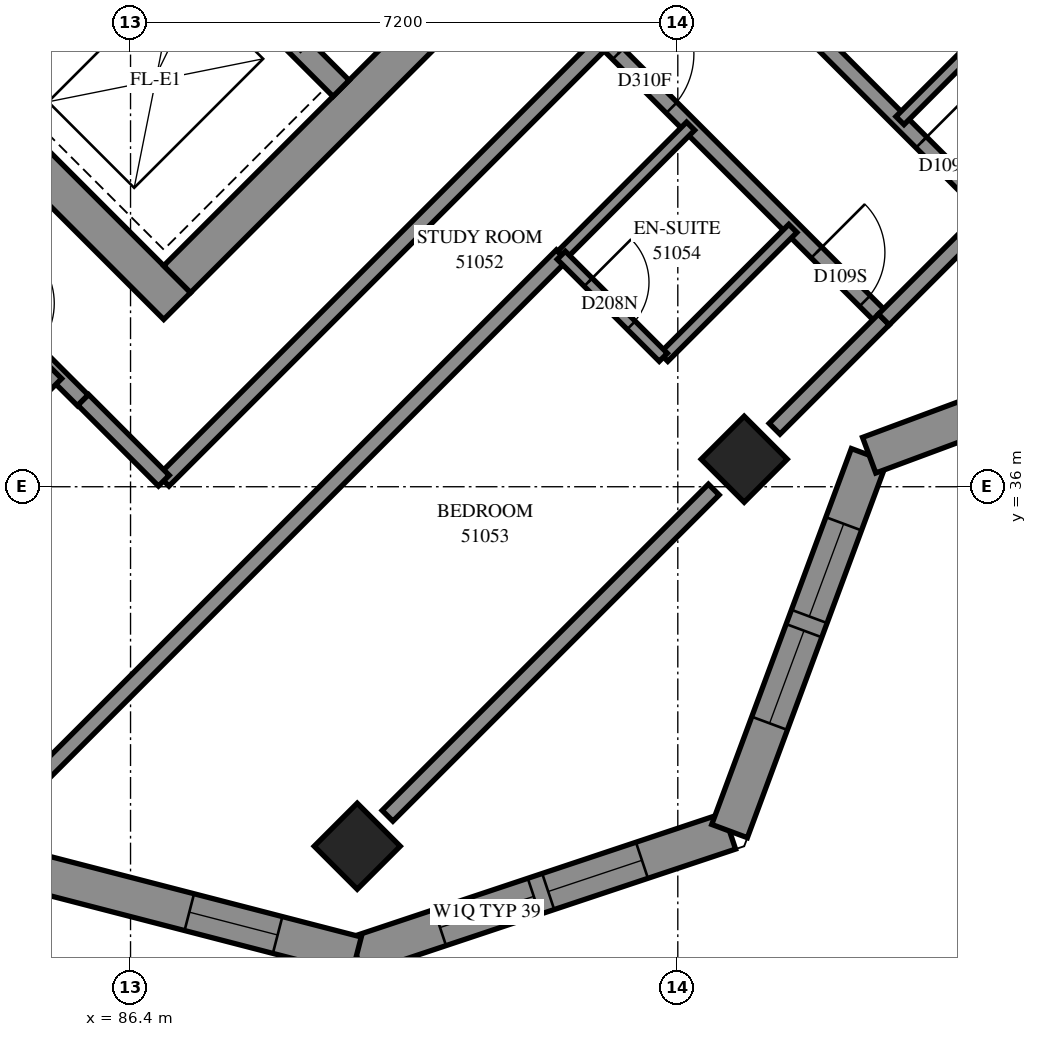
"""IFC4 building model, lengths in metres.
Left out: names, types, materials, properties, quantities, classifications, styles, units other than length and angle.
Written with IfcOpenShell. Run it as: python <this file> out.ifc"""

import sys

from ifc_helpers import new_model, si_unit, direction, frame, frame_2d, origin, origin_2d, place, context, subcontext, project, spatial, polyline, rectangle, outline, extrude, element, fill, save


model = new_model("IFC4")
c1 = context("Model", 3, precision=1e-05, world=origin(), true_north=direction((0.0, 1.0)))
c2 = subcontext(c1, "Body", "Model", "MODEL_VIEW")
j1 = project(units=[si_unit("LENGTHUNIT", "METRE"), si_unit("PLANEANGLEUNIT", "RADIAN")], contexts=[c1])
p1 = place(None, origin())
s1 = spatial("IfcSite", under=j1, at=p1, CompositionType="ELEMENT")
p2 = place(p1, origin())
s2 = spatial("IfcBuilding", under=s1, at=p2, CompositionType="ELEMENT")
p3 = place(p2, frame((0.0, 0.0, 189.6)))
s3 = spatial("IfcBuildingStorey", under=s2, at=p3, CompositionType="ELEMENT", Elevation=189.6)
for number, where, z_axis, x_axis in (
    (1, (94.474, 36.362, 0.0), (0.0, 0.0, 1.0), (0.707, -0.707, 0.0)),
    (2, (89.382, 31.271, 0.0), (0.0, 0.0, 1.0), (0.707, -0.707, 0.0)),
):
    element("IfcColumn", number, at=place(p3, frame(where, z_axis=z_axis, x_axis=x_axis)), inside=s3, PredefinedType="COLUMN", context=c2, shape_type="SweptSolid", body=[
        extrude(rectangle(XDim=0.8, YDim=0.8, at=origin_2d()), origin(), (0.0, 0.0, 1.0), 3.1),
    ])
p4 = place(p3, frame((76.124, 49.267, -0.3), z_axis=(0.0, 0.0, 1.0), x_axis=(0.7071067812, -0.7071067812, 0.0)))
e3 = element("IfcWall", 3, at=p4, inside=s3, PredefinedType="SHEAR", context=c2, shape_type="SweptSolid", body=[
    extrude(rectangle(XDim=15.4, YDim=0.5, at=frame_2d((7.7, 0.0))), origin(), (0.0, 0.0, 1.0), 2.7),
])
p5 = place(p3, frame((87.013, 38.731, -0.3), z_axis=(0.0, 0.0, 1.0), x_axis=(0.7071067812, 0.7071067812, 0.0)))
e4 = element("IfcWall", 4, at=p5, inside=s3, PredefinedType="SHEAR", context=c2, shape_type="SweptSolid", body=[
    extrude(rectangle(XDim=14.4, YDim=0.5, at=frame_2d((7.2, 0.0))), origin(), (0.0, 0.0, 1.0), 2.7),
])
p6 = place(p5, frame((4.55, 0.0, 0.3)))
e5 = element("IfcOpeningElement", 5, at=p6, cuts=e4, PredefinedType="OPENING", context=c2, shape_type="SweptSolid", body=[
    extrude(rectangle(XDim=1.1, YDim=2.1, at=frame_2d((0.55, 1.05))), frame((0.0, 0.26, 0.0), z_axis=(0.0, -1.0, 0.0), x_axis=(1.0, 0.0, 0.0)), (0.0, 0.0, 1.0), 0.52),
])
p7 = place(p5, frame((11.35, 0.0, 0.3)))
e6 = element("IfcOpeningElement", 6, at=p7, cuts=e4, PredefinedType="OPENING", context=c2, shape_type="SweptSolid", body=[
    extrude(rectangle(XDim=1.1, YDim=2.1, at=frame_2d((0.55, 1.05))), frame((0.0, 0.26, 0.0), z_axis=(0.0, -1.0, 0.0), x_axis=(1.0, 0.0, 0.0)), (0.0, 0.0, 1.0), 0.52),
])
p8 = place(p3, frame((84.291, 41.453, 0.0), z_axis=(0.0, 0.0, 1.0), x_axis=(0.7071067812, 0.7071067812, 0.0)))
e7 = element("IfcWall", 7, at=p8, inside=s3, PredefinedType="SOLIDWALL", context=c2, shape_type="SweptSolid", body=[
    extrude(rectangle(XDim=3.3, YDim=0.3, at=frame_2d((1.65, 0.0))), origin(), (0.0, 0.0, 1.0), 3.1),
])
p9 = place(p3, frame((78.988, 51.423, 0.0), z_axis=(0.0, 0.0, 1.0), x_axis=(0.7071067812, -0.7071067812, 0.0)))
e8 = element("IfcWall", 8, at=p9, inside=s3, PredefinedType="SOLIDWALL", context=c2, shape_type="SweptSolid", body=[
    extrude(rectangle(XDim=14.4, YDim=0.3, at=frame_2d((7.2, 0.0))), origin(), (0.0, 0.0, 1.0), 3.1),
])
p10 = place(p9, frame((1.35, 0.0, 0.0)))
e9 = element("IfcOpeningElement", 9, at=p10, cuts=e8, PredefinedType="OPENING", context=c2, shape_type="SweptSolid", body=[
    extrude(rectangle(XDim=0.9, YDim=2.1, at=frame_2d((0.45, 1.05))), frame((0.0, 0.16, 0.0), z_axis=(0.0, -1.0, 0.0), x_axis=(1.0, 0.0, 0.0)), (0.0, 0.0, 1.0), 0.32),
])
p11 = place(p9, frame((4.95, 0.0, 0.0)))
e10 = element("IfcOpeningElement", 10, at=p11, cuts=e8, PredefinedType="OPENING", context=c2, shape_type="SweptSolid", body=[
    extrude(rectangle(XDim=0.9, YDim=2.1, at=frame_2d((0.45, 1.05))), frame((0.0, 0.16, 0.0), z_axis=(0.0, -1.0, 0.0), x_axis=(1.0, 0.0, 0.0)), (0.0, 0.0, 1.0), 0.32),
])
p12 = place(p9, frame((8.55, 0.0, 0.0)))
e11 = element("IfcOpeningElement", 11, at=p12, cuts=e8, PredefinedType="OPENING", context=c2, shape_type="SweptSolid", body=[
    extrude(rectangle(XDim=0.9, YDim=2.1, at=frame_2d((0.45, 1.05))), frame((0.0, 0.16, 0.0), z_axis=(0.0, -1.0, 0.0), x_axis=(1.0, 0.0, 0.0)), (0.0, 0.0, 1.0), 0.32),
])
p13 = place(p9, frame((12.05, 0.0, 0.0)))
e12 = element("IfcOpeningElement", 12, at=p13, cuts=e8, PredefinedType="OPENING", context=c2, shape_type="SweptSolid", body=[
    extrude(rectangle(XDim=1.1, YDim=2.1, at=frame_2d((0.55, 1.05))), frame((0.0, 0.16, 0.0), z_axis=(0.0, -1.0, 0.0), x_axis=(1.0, 0.0, 0.0)), (0.0, 0.0, 1.0), 0.32),
])
p14 = place(p3, frame((89.373, 29.834, 0.0), z_axis=(0.0, 0.0, 1.0), x_axis=(0.9486832981, 0.316227766, 0.0)))
e13 = element("IfcWall", 13, at=p14, inside=s3, PredefinedType="SOLIDWALL", context=c2, shape_type="SweptSolid", body=[
    extrude(outline(polyline([(-0.074, -0.25), (5.293, -0.25), (5.053, 0.25), (0.074, 0.25), (-0.074, -0.25)])), origin(), (0.0, 0.0, 1.0), 3.1),
])
p15 = place(p14, frame((1.158, 0.0, 0.45)))
e14 = element("IfcOpeningElement", 14, at=p15, cuts=e13, PredefinedType="OPENING", context=c2, shape_type="SweptSolid", body=[
    extrude(rectangle(XDim=1.3, YDim=2.5, at=frame_2d((0.65, 1.25))), frame((0.0, 0.26, 0.0), z_axis=(0.0, -1.0, 0.0), x_axis=(1.0, 0.0, 0.0)), (0.0, 0.0, 1.0), 0.52),
])
p16 = place(p14, frame((2.658, 0.0, 0.45)))
e15 = element("IfcOpeningElement", 15, at=p16, cuts=e13, PredefinedType="OPENING", context=c2, shape_type="SweptSolid", body=[
    extrude(rectangle(XDim=1.3, YDim=2.5, at=frame_2d((0.65, 1.25))), frame((0.0, 0.26, 0.0), z_axis=(0.0, -1.0, 0.0), x_axis=(1.0, 0.0, 0.0)), (0.0, 0.0, 1.0), 0.52),
])
p17 = place(p3, frame((94.281, 31.47, 0.0), z_axis=(0.0, 0.0, 1.0), x_axis=(0.3481903374, 0.9374238577, 0.0)))
e16 = element("IfcWall", 16, at=p17, inside=s3, PredefinedType="SOLIDWALL", context=c2, shape_type="SweptSolid", body=[
    extrude(outline(polyline([(-0.12, -0.25), (5.16, -0.25), (5.39, 0.25), (0.12, 0.25), (-0.12, -0.25)])), origin(), (0.0, 0.0, 1.0), 3.1),
])
p18 = place(p17, frame((1.512, 0.0, 0.45)))
e17 = element("IfcOpeningElement", 17, at=p18, cuts=e16, PredefinedType="OPENING", context=c2, shape_type="SweptSolid", body=[
    extrude(rectangle(XDim=1.3, YDim=2.5, at=frame_2d((0.65, 1.25))), frame((0.0, 0.26, 0.0), z_axis=(0.0, -1.0, 0.0), x_axis=(1.0, 0.0, 0.0)), (0.0, 0.0, 1.0), 0.52),
])
p19 = place(p17, frame((3.012, 0.0, 0.45)))
e18 = element("IfcOpeningElement", 18, at=p19, cuts=e16, PredefinedType="OPENING", context=c2, shape_type="SweptSolid", body=[
    extrude(rectangle(XDim=1.3, YDim=2.5, at=frame_2d((0.65, 1.25))), frame((0.0, 0.26, 0.0), z_axis=(0.0, -1.0, 0.0), x_axis=(1.0, 0.0, 0.0)), (0.0, 0.0, 1.0), 0.52),
])
p20 = place(p3, frame((96.118, 36.415, 0.0), z_axis=(0.0, 0.0, 1.0), x_axis=(0.9374238577, 0.3481903374, 0.0)))
e19 = element("IfcWall", 19, at=p20, inside=s3, PredefinedType="SOLIDWALL", context=c2, shape_type="SweptSolid", body=[
    extrude(outline(polyline([(0.115, -0.25), (5.395, -0.25), (5.155, 0.25), (-0.115, 0.25), (0.115, -0.25)])), origin(), (0.0, 0.0, 1.0), 3.1),
])
p21 = place(p20, frame((1.655, 0.0, 0.45)))
e20 = element("IfcOpeningElement", 20, at=p21, cuts=e19, PredefinedType="OPENING", context=c2, shape_type="SweptSolid", body=[
    extrude(rectangle(XDim=1.3, YDim=2.5, at=frame_2d((0.65, 1.25))), frame((0.0, 0.26, 0.0), z_axis=(0.0, -1.0, 0.0), x_axis=(1.0, 0.0, 0.0)), (0.0, 0.0, 1.0), 0.52),
])
p22 = place(p20, frame((3.155, 0.0, 0.45)))
e21 = element("IfcOpeningElement", 21, at=p22, cuts=e19, PredefinedType="OPENING", context=c2, shape_type="SweptSolid", body=[
    extrude(rectangle(XDim=1.3, YDim=2.5, at=frame_2d((0.65, 1.25))), frame((0.0, 0.26, 0.0), z_axis=(0.0, -1.0, 0.0), x_axis=(1.0, 0.0, 0.0)), (0.0, 0.0, 1.0), 0.52),
])
p23 = place(p3, frame((85.003, 30.965, 0.0), z_axis=(0.0, 0.0, 1.0), x_axis=(0.9681215403, -0.2504809037, 0.0)))
e22 = element("IfcWall", 22, at=p23, inside=s3, PredefinedType="SOLIDWALL", context=c2, shape_type="SweptSolid", body=[
    extrude(outline(polyline([(-0.141, -0.25), (4.588, -0.25), (4.441, 0.25), (0.141, 0.25), (-0.141, -0.25)])), origin(), (0.0, 0.0, 1.0), 3.1),
])
p24 = place(p23, frame((2.242, 0.0, 0.45)))
e23 = element("IfcOpeningElement", 23, at=p24, cuts=e22, PredefinedType="OPENING", context=c2, shape_type="SweptSolid", body=[
    extrude(rectangle(XDim=1.2, YDim=2.5, at=frame_2d((0.6, 1.25))), frame((0.0, 0.26, 0.0), z_axis=(0.0, -1.0, 0.0), x_axis=(1.0, 0.0, 0.0)), (0.0, 0.0, 1.0), 0.52),
])
p25 = place(p3, frame((84.971, 31.945, 0.0), z_axis=(0.0, 0.0, 1.0), x_axis=(0.7072312442, 0.7069822963, 0.0)))
e24 = element("IfcWall", 24, at=p25, inside=s3, PredefinedType="PARTITIONING", context=c2, shape_type="SweptSolid", body=[
    extrude(rectangle(XDim=10.042, YDim=0.2, at=frame_2d((5.021, 0.0))), origin(), (0.0, 0.0, 1.0), 3.1),
])
p26 = place(p3, frame((86.835, 36.079, 0.0), z_axis=(0.0, 0.0, 1.0), x_axis=(0.7071067812, 0.7071067812, 0.0)))
e25 = element("IfcWall", 25, at=p26, inside=s3, PredefinedType="PARTITIONING", context=c2, shape_type="SweptSolid", body=[
    extrude(rectangle(XDim=8.2, YDim=0.2, at=frame_2d((4.1, 0.0))), origin(), (0.0, 0.0, 1.0), 3.1),
])
p27 = place(p3, frame((80.849, 42.061, 0.0), z_axis=(0.0, 0.0, 1.0), x_axis=(0.7071067812, -0.7071067812, 0.0)))
e26 = element("IfcWall", 26, at=p27, inside=s3, PredefinedType="PARTITIONING", context=c2, shape_type="SweptSolid", body=[
    extrude(rectangle(XDim=6.964, YDim=0.2, at=frame_2d((3.482, 0.0))), origin(), (0.0, 0.0, 1.0), 3.1),
])
p28 = place(p27, frame((5.159, 0.0, 0.0)))
e27 = element("IfcOpeningElement", 27, at=p28, cuts=e26, PredefinedType="OPENING", context=c2, shape_type="SweptSolid", body=[
    extrude(rectangle(XDim=0.9, YDim=2.1, at=frame_2d((0.45, 1.05))), frame((0.0, 0.11, 0.0), z_axis=(0.0, -1.0, 0.0), x_axis=(1.0, 0.0, 0.0)), (0.0, 0.0, 1.0), 0.22),
])
p29 = place(p3, frame((89.781, 31.671, 0.0), z_axis=(0.0, 0.0, 1.0), x_axis=(0.7071067812, 0.7071067812, 0.0)))
e28 = element("IfcWall", 28, at=p29, inside=s3, PredefinedType="PARTITIONING", context=c2, shape_type="SweptSolid", body=[
    extrude(rectangle(XDim=6.07, YDim=0.2, at=frame_2d((3.035, 0.0))), origin(), (0.0, 0.0, 1.0), 2.6),
])
p30 = place(p3, frame((94.047, 43.287, 0.0), z_axis=(0.0, 0.0, 1.0), x_axis=(0.7071067812, -0.7071067812, 0.0)))
e29 = element("IfcWall", 29, at=p30, inside=s3, PredefinedType="PARTITIONING", context=c2, shape_type="SweptSolid", body=[
    extrude(rectangle(XDim=5.199, YDim=0.2, at=frame_2d((2.599, 0.0))), origin(), (0.0, 0.0, 1.0), 3.1),
])
p31 = place(p30, frame((3.898, 0.0, 0.0)))
e30 = element("IfcOpeningElement", 30, at=p31, cuts=e29, PredefinedType="OPENING", context=c2, shape_type="SweptSolid", body=[
    extrude(rectangle(XDim=0.9, YDim=2.1, at=frame_2d((0.45, 1.05))), frame((0.0, 0.11, 0.0), z_axis=(0.0, -1.0, 0.0), x_axis=(1.0, 0.0, 0.0)), (0.0, 0.0, 1.0), 0.22),
])
p32 = place(p3, frame((92.633, 41.873, 0.0), z_axis=(0.0, 0.0, 1.0), x_axis=(0.7071067812, -0.7071067812, 0.0)))
e31 = element("IfcWall", 31, at=p32, inside=s3, PredefinedType="PARTITIONING", context=c2, shape_type="SweptSolid", body=[
    extrude(rectangle(XDim=5.199, YDim=0.2, at=frame_2d((2.599, 0.0))), origin(), (0.0, 0.0, 1.0), 3.1),
])
p33 = place(p32, frame((0.253, 0.0, 0.0)))
e32 = element("IfcOpeningElement", 32, at=p33, cuts=e31, PredefinedType="OPENING", context=c2, shape_type="SweptSolid", body=[
    extrude(rectangle(XDim=1.0, YDim=2.1, at=frame_2d((0.5, 1.05))), frame((0.0, 0.11, 0.0), z_axis=(0.0, -1.0, 0.0), x_axis=(1.0, 0.0, 0.0)), (0.0, 0.0, 1.0), 0.22),
])
p34 = place(p32, frame((3.948, 0.0, 0.0)))
e33 = element("IfcOpeningElement", 33, at=p34, cuts=e31, PredefinedType="OPENING", context=c2, shape_type="SweptSolid", body=[
    extrude(rectangle(XDim=0.9, YDim=2.1, at=frame_2d((0.45, 1.05))), frame((0.0, 0.11, 0.0), z_axis=(0.0, -1.0, 0.0), x_axis=(1.0, 0.0, 0.0)), (0.0, 0.0, 1.0), 0.22),
])
p35 = place(p3, frame((96.523, 40.817, 0.0), z_axis=(0.0, 0.0, 1.0), x_axis=(0.7071067812, 0.7071067812, 0.0)))
e34 = element("IfcWall", 34, at=p35, inside=s3, PredefinedType="PARTITIONING", context=c2, shape_type="SweptSolid", body=[
    extrude(rectangle(XDim=2.401, YDim=0.15, at=frame_2d((1.201, 0.0))), origin(), (0.0, 0.0, 1.0), 3.1),
])
for number, where, z_axis, x_axis in (
    (35, (92.072, 39.046, 0.0), (0.0, 0.0, 1.0), (0.707, 0.708, 0.0)),
    (36, (93.415, 37.703, 0.0), (0.0, 0.0, 1.0), (0.708, 0.707, 0.0)),
):
    element("IfcWall", number, at=place(p3, frame(where, z_axis=z_axis, x_axis=x_axis)), inside=s3, PredefinedType="PARTITIONING", context=c2, shape_type="SweptSolid", body=[
        extrude(rectangle(XDim=2.4, YDim=0.15, at=frame_2d((1.2, 0.0))), origin(), (0.0, 0.0, 1.0), 3.1),
    ])
p36 = place(p3, frame((94.873, 36.763, 0.0), z_axis=(0.0, 0.0, 1.0), x_axis=(0.7071067812, 0.7071067812, 0.0)))
e37 = element("IfcWall", 37, at=p36, inside=s3, PredefinedType="PARTITIONING", context=c2, shape_type="SweptSolid", body=[
    extrude(rectangle(XDim=2.034, YDim=0.2, at=frame_2d((1.017, 0.0))), origin(), (0.0, 0.0, 1.0), 2.6),
])
p37 = place(p3, frame((96.311, 38.201, 0.0), z_axis=(0.0, 0.0, 1.0), x_axis=(0.7071067812, 0.7071067812, 0.0)))
e38 = element("IfcWall", 38, at=p37, inside=s3, PredefinedType="PARTITIONING", context=c2, shape_type="SweptSolid", body=[
    extrude(rectangle(XDim=2.0, YDim=0.2, at=frame_2d((1.0, 0.0))), origin(), (0.0, 0.0, 1.0), 2.6),
])
p38 = place(p3, frame((92.067, 39.045, 0.0), z_axis=(0.0, 0.0, 1.0), x_axis=(0.7071067812, -0.7071067812, 0.0)))
e39 = element("IfcWall", 39, at=p38, inside=s3, PredefinedType="PARTITIONING", context=c2, shape_type="SweptSolid", body=[
    extrude(rectangle(XDim=1.898, YDim=0.15, at=frame_2d((0.949, 0.0))), origin(), (0.0, 0.0, 1.0), 3.1),
])
p39 = place(p38, frame((0.501, 0.0, 0.0)))
e40 = element("IfcOpeningElement", 40, at=p39, cuts=e39, PredefinedType="OPENING", context=c2, shape_type="SweptSolid", body=[
    extrude(rectangle(XDim=0.8, YDim=2.1, at=frame_2d((0.4, 1.05))), frame((0.0, 0.085, 0.0), z_axis=(0.0, -1.0, 0.0), x_axis=(1.0, 0.0, 0.0)), (0.0, 0.0, 1.0), 0.17),
])
p40 = place(p3, frame((85.778, 37.142, 0.0), z_axis=(0.0, 0.0, 1.0), x_axis=(0.7064400143, -0.70777292, 0.0)))
e41 = element("IfcWall", 41, at=p40, inside=s3, PredefinedType="PARTITIONING", context=c2, shape_type="SweptSolid", body=[
    extrude(rectangle(XDim=1.5, YDim=0.2, at=frame_2d((0.75, 0.0))), origin(), (0.0, 0.0, 1.0), 3.1),
])
p41 = place(p3, frame((84.693, 36.761, 0.0), z_axis=(0.0, 0.0, 1.0), x_axis=(0.7061388061, 0.708073433, 0.0)))
e42 = element("IfcWall", 42, at=p41, inside=s3, PredefinedType="PARTITIONING", context=c2, shape_type="SweptSolid", body=[
    extrude(rectangle(XDim=1.034, YDim=0.2, at=frame_2d((0.517, 0.0))), origin(), (0.0, 0.0, 1.0), 3.1),
])
p42 = place(p15, origin())
e43 = element("IfcWindow", 43, at=p42, inside=s3, PartitioningType="SINGLE_PANEL", PredefinedType="WINDOW", context=c2, shape_type="SweptSolid", body=[
    extrude(rectangle(XDim=1.3, YDim=2.5, at=frame_2d((0.65, 1.25))), frame((0.0, 0.18, 0.0), z_axis=(0.0, -1.0, 0.0), x_axis=(1.0, 0.0, 0.0)), (0.0, 0.0, 1.0), 0.06),
])
fill(e14, e43)
p43 = place(p16, origin())
e44 = element("IfcWindow", 44, at=p43, inside=s3, PartitioningType="SINGLE_PANEL", PredefinedType="WINDOW", context=c2, shape_type="SweptSolid", body=[
    extrude(rectangle(XDim=1.3, YDim=2.5, at=frame_2d((0.65, 1.25))), frame((0.0, 0.18, 0.0), z_axis=(0.0, -1.0, 0.0), x_axis=(1.0, 0.0, 0.0)), (0.0, 0.0, 1.0), 0.06),
])
fill(e15, e44)
p44 = place(p18, origin())
e45 = element("IfcWindow", 45, at=p44, inside=s3, PartitioningType="SINGLE_PANEL", PredefinedType="WINDOW", context=c2, shape_type="SweptSolid", body=[
    extrude(rectangle(XDim=1.3, YDim=2.5, at=frame_2d((0.65, 1.25))), frame((0.0, 0.18, 0.0), z_axis=(0.0, -1.0, 0.0), x_axis=(1.0, 0.0, 0.0)), (0.0, 0.0, 1.0), 0.06),
])
fill(e17, e45)
p45 = place(p19, origin())
e46 = element("IfcWindow", 46, at=p45, inside=s3, PartitioningType="SINGLE_PANEL", PredefinedType="WINDOW", context=c2, shape_type="SweptSolid", body=[
    extrude(rectangle(XDim=1.3, YDim=2.5, at=frame_2d((0.65, 1.25))), frame((0.0, 0.18, 0.0), z_axis=(0.0, -1.0, 0.0), x_axis=(1.0, 0.0, 0.0)), (0.0, 0.0, 1.0), 0.06),
])
fill(e18, e46)
p46 = place(p24, origin())
e47 = element("IfcWindow", 47, at=p46, inside=s3, PartitioningType="SINGLE_PANEL", PredefinedType="WINDOW", context=c2, shape_type="SweptSolid", body=[
    extrude(rectangle(XDim=1.2, YDim=2.5, at=frame_2d((0.6, 1.25))), frame((0.0, 0.18, 0.0), z_axis=(0.0, -1.0, 0.0), x_axis=(1.0, 0.0, 0.0)), (0.0, 0.0, 1.0), 0.06),
])
fill(e23, e47)
p47 = place(p33, origin())
e48 = element("IfcDoor", 48, at=p47, inside=s3, OperationType="SINGLE_SWING_RIGHT", PredefinedType="DOOR", context=c2, shape_type="SweptSolid", body=[
    extrude(rectangle(XDim=1.0, YDim=2.1, at=frame_2d((0.5, 1.05))), frame((0.0, 0.025, 0.0), z_axis=(0.0, -1.0, 0.0), x_axis=(1.0, 0.0, 0.0)), (0.0, 0.0, 1.0), 0.05),
])
fill(e32, e48)
p48 = place(p34, origin())
e49 = element("IfcDoor", 49, at=p48, inside=s3, OperationType="SINGLE_SWING_LEFT", PredefinedType="DOOR", context=c2, shape_type="SweptSolid", body=[
    extrude(rectangle(XDim=0.9, YDim=2.1, at=frame_2d((0.45, 1.05))), frame((0.0, 0.025, 0.0), z_axis=(0.0, -1.0, 0.0), x_axis=(1.0, 0.0, 0.0)), (0.0, 0.0, 1.0), 0.05),
])
fill(e33, e49)
p49 = place(p39, origin())
e50 = element("IfcDoor", 50, at=p49, inside=s3, OperationType="SINGLE_SWING_RIGHT", PredefinedType="DOOR", context=c2, shape_type="SweptSolid", body=[
    extrude(rectangle(XDim=0.8, YDim=2.1, at=frame_2d((0.4, 1.05))), frame((0.0, 0.025, 0.0), z_axis=(0.0, -1.0, 0.0), x_axis=(1.0, 0.0, 0.0)), (0.0, 0.0, 1.0), 0.05),
])
fill(e40, e50)
p50 = place(p31, origin())
e51 = element("IfcDoor", 51, at=p50, inside=s3, OperationType="SINGLE_SWING_RIGHT", PredefinedType="DOOR", context=c2, shape_type="SweptSolid", body=[
    extrude(rectangle(XDim=0.9, YDim=2.1, at=frame_2d((0.45, 1.05))), frame((0.0, 0.025, 0.0), z_axis=(0.0, -1.0, 0.0), x_axis=(1.0, 0.0, 0.0)), (0.0, 0.0, 1.0), 0.05),
])
fill(e30, e51)
save(model, sys.argv[1])
